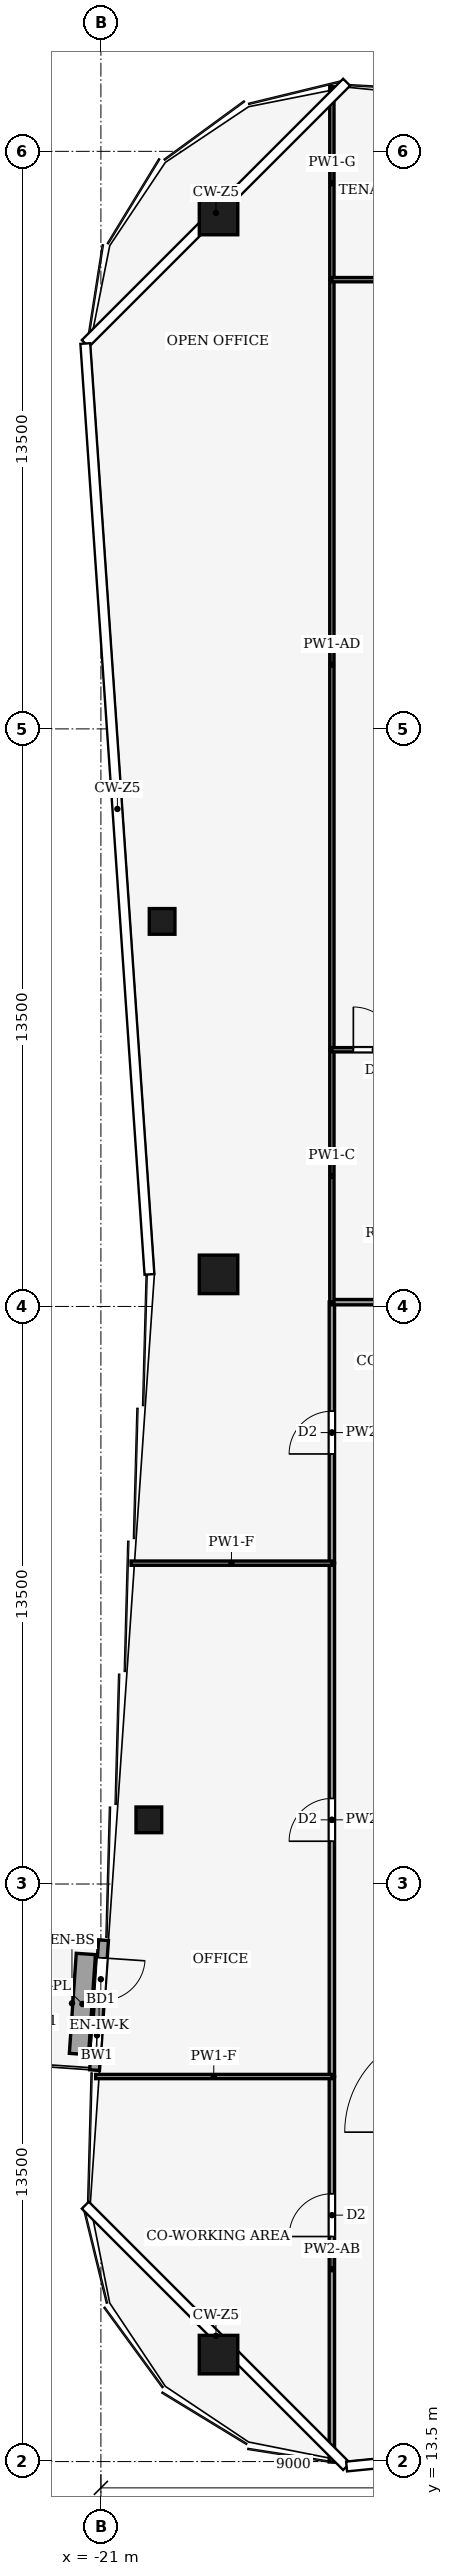
"""IFC4 building model, lengths in metres.
Left out: names, types, materials, properties, quantities, classifications, styles, units other than length and angle.
Written with IfcOpenShell. Run it as: python <this file> out.ifc"""

import sys

from ifc_helpers import new_model, si_unit, direction, frame, frame_2d, origin, origin_2d, place, context, subcontext, project, spatial, rectangle, hollow_rectangle, extrude, element, fill, save


model = new_model("IFC4")
c1 = context("Model", 3, precision=1e-05, world=origin(), true_north=direction((0.0, 1.0)))
c2 = subcontext(c1, "Body", "Model", "MODEL_VIEW")
j1 = project(units=[si_unit("LENGTHUNIT", "METRE"), si_unit("PLANEANGLEUNIT", "RADIAN")], contexts=[c1])
p1 = place(None, origin())
s1 = spatial("IfcSite", under=j1, at=p1, CompositionType="ELEMENT")
p2 = place(p1, origin())
s2 = spatial("IfcBuilding", under=s1, at=p2, CompositionType="ELEMENT")
p3 = place(p2, frame((0.0, 0.0, 302.0)))
s3 = spatial("IfcBuildingStorey", under=s2, at=p3, CompositionType="ELEMENT", Elevation=302.0)
for number, where, z_axis, x_axis in (
    (1, (-18.25, 66.0, 0.0), (0.0, 0.0, 1.0), (1.0, 0.0, 0.0)),
    (2, (-18.25, 16.0, 0.0), (0.0, 0.0, 1.0), (1.0, 0.0, 0.0)),
    (3, (-18.25, 41.25, 0.0), (0.0, 0.0, 1.0), (1.0, 0.0, 0.0)),
):
    element("IfcColumn", number, at=place(p3, frame(where, z_axis=z_axis, x_axis=x_axis)), inside=s3, PredefinedType="COLUMN", context=c2, shape_type="SweptSolid", body=[
        extrude(hollow_rectangle(XDim=0.9, YDim=0.9, WallThickness=0.04, at=origin_2d()), origin(), (0.0, 0.0, 1.0), 4.0),
    ])
for number, where, z_axis, x_axis in (
    (4, (-19.879, 28.5, 0.0), (0.0, 0.0, 1.0), (1.0, 0.0, 0.0)),
    (5, (-19.569, 49.5, 0.0), (0.0, 0.0, 1.0), (1.0, 0.0, 0.0)),
):
    element("IfcColumn", number, at=place(p3, frame(where, z_axis=z_axis, x_axis=x_axis)), inside=s3, PredefinedType="COLUMN", context=c2, shape_type="SweptSolid", body=[
        extrude(hollow_rectangle(XDim=0.6, YDim=0.6, WallThickness=0.025, at=origin_2d()), origin(), (0.0, 0.0, 1.0), 4.0),
    ])
p4 = place(p3, frame((-20.938, 25.687, 0.0), z_axis=(0.0, 0.0, 1.0), x_axis=(-0.068802091615, -0.997630328423, 0.0)))
e6 = element("IfcWall", 6, at=p4, inside=s3, PredefinedType="SOLIDWALL", context=c2, shape_type="SweptSolid", body=[
    extrude(rectangle(XDim=3.045, YDim=0.23, at=frame_2d((1.522, 0.0))), origin(), (0.0, 0.0, 1.0), 3.65),
])
p5 = place(p4, frame((0.415, 0.0, 0.0)))
e7 = element("IfcOpeningElement", 7, at=p5, cuts=e6, PredefinedType="OPENING", context=c2, shape_type="SweptSolid", body=[
    extrude(rectangle(XDim=1.0, YDim=2.1, at=frame_2d((0.5, 1.05))), frame((0.0, 0.125, 0.0), z_axis=(0.0, -1.0, 0.0), x_axis=(1.0, 0.0, 0.0)), (0.0, 0.0, 1.0), 0.25),
])
p6 = place(p4, frame((1.83, 0.0, 0.9)))
e8 = element("IfcOpeningElement", 8, at=p6, cuts=e6, PredefinedType="OPENING", context=c2, shape_type="SweptSolid", body=[
    extrude(rectangle(XDim=0.8, YDim=1.2, at=frame_2d((0.4, 0.6))), frame((0.0, 0.125, 0.0), z_axis=(0.0, -1.0, 0.0), x_axis=(1.0, 0.0, 0.0)), (0.0, 0.0, 1.0), 0.25),
])
p7 = place(p3, frame((-21.352, 25.365, 0.0), z_axis=(0.0, 0.0, 1.0), x_axis=(-0.068723472833, -0.997635747295, 0.0)))
e9 = element("IfcWall", 9, at=p7, inside=s3, PredefinedType="USERDEFINED", context=c2, shape_type="SweptSolid", body=[
    extrude(rectangle(XDim=2.345, YDim=0.45, at=frame_2d((1.172, 0.0))), origin(), (0.0, 0.0, 1.0), 0.4),
])
p8 = place(p3, frame((-15.6, 13.49, 0.0), z_axis=(0.0, 0.0, 1.0), x_axis=(0.0, 1.0, 0.0)))
e10 = element("IfcWall", 10, at=p8, inside=s3, PredefinedType="PARTITIONING", context=c2, shape_type="SweptSolid", body=[
    extrude(rectangle(XDim=9.01, YDim=0.125, at=frame_2d((4.505, 0.0))), origin(), (0.0, 0.0, 1.0), 2.93),
])
p9 = place(p8, frame((5.271, 0.0, 0.0)))
e11 = element("IfcOpeningElement", 11, at=p9, cuts=e10, PredefinedType="OPENING", context=c2, shape_type="SweptSolid", body=[
    extrude(rectangle(XDim=1.0, YDim=2.1, at=frame_2d((0.5, 1.05))), frame((0.0, 0.073, 0.0), z_axis=(0.0, -1.0, 0.0), x_axis=(1.0, 0.0, 0.0)), (0.0, 0.0, 1.0), 0.145),
])
p10 = place(p3, frame((-15.6, 22.5, 0.0), z_axis=(0.0, 0.0, 1.0), x_axis=(0.0, 1.0, 0.0)))
e12 = element("IfcWall", 12, at=p10, inside=s3, PredefinedType="PARTITIONING", context=c2, shape_type="SweptSolid", body=[
    extrude(rectangle(XDim=12.0, YDim=0.125, at=frame_2d((6.0, 0.0))), origin(), (0.0, 0.0, 1.0), 3.54),
])
p11 = place(p10, frame((5.5, 0.0, 0.0)))
e13 = element("IfcOpeningElement", 13, at=p11, cuts=e12, PredefinedType="OPENING", context=c2, shape_type="SweptSolid", body=[
    extrude(rectangle(XDim=1.0, YDim=2.1, at=frame_2d((0.5, 1.05))), frame((0.0, 0.073, 0.0), z_axis=(0.0, -1.0, 0.0), x_axis=(1.0, 0.0, 0.0)), (0.0, 0.0, 1.0), 0.145),
])
p12 = place(p3, frame((-15.6, 34.5, 0.0), z_axis=(0.0, 0.0, 1.0), x_axis=(0.0, 1.0, 0.0)))
e14 = element("IfcWall", 14, at=p12, inside=s3, PredefinedType="PARTITIONING", context=c2, shape_type="SweptSolid", body=[
    extrude(rectangle(XDim=6.104, YDim=0.125, at=frame_2d((3.052, 0.0))), origin(), (0.0, 0.0, 1.0), 3.14),
])
p13 = place(p12, frame((2.552, 0.0, 0.0)))
e15 = element("IfcOpeningElement", 15, at=p13, cuts=e14, PredefinedType="OPENING", context=c2, shape_type="SweptSolid", body=[
    extrude(rectangle(XDim=1.0, YDim=2.1, at=frame_2d((0.5, 1.05))), frame((0.0, 0.073, 0.0), z_axis=(0.0, -1.0, 0.0), x_axis=(1.0, 0.0, 0.0)), (0.0, 0.0, 1.0), 0.145),
])
p14 = place(p3, frame((-15.6, 40.6, 0.0), z_axis=(0.0, 0.0, 1.0), x_axis=(1.0, 0.0, 0.0)))
e16 = element("IfcWall", 16, at=p14, inside=s3, PredefinedType="PARTITIONING", context=c2, shape_type="SweptSolid", body=[
    extrude(rectangle(XDim=3.6, YDim=0.125, at=frame_2d((1.8, 0.0))), origin(), (0.0, 0.0, 1.0), 3.39),
])
p15 = place(p14, frame((1.3, 0.0, 0.0)))
e17 = element("IfcOpeningElement", 17, at=p15, cuts=e16, PredefinedType="OPENING", context=c2, shape_type="SweptSolid", body=[
    extrude(rectangle(XDim=1.0, YDim=2.1, at=frame_2d((0.5, 1.05))), frame((0.0, 0.073, 0.0), z_axis=(0.0, -1.0, 0.0), x_axis=(1.0, 0.0, 0.0)), (0.0, 0.0, 1.0), 0.145),
])
p16 = place(p3, frame((-15.6, 22.5, 0.0), z_axis=(0.0, 0.0, 1.0), x_axis=(-1.0, 0.0, 0.0)))
e18 = element("IfcWall", 18, at=p16, inside=s3, PredefinedType="PARTITIONING", context=c2, shape_type="SweptSolid", body=[
    extrude(rectangle(XDim=5.523, YDim=0.1, at=frame_2d((2.761, 0.0))), origin(), (0.0, 0.0, 1.0), 3.04),
])
p17 = place(p3, frame((-15.6, 34.5, 0.0), z_axis=(0.0, 0.0, 1.0), x_axis=(-1.0, 0.0, 0.0)))
e19 = element("IfcWall", 19, at=p17, inside=s3, PredefinedType="PARTITIONING", context=c2, shape_type="SweptSolid", body=[
    extrude(rectangle(XDim=4.695, YDim=0.1, at=frame_2d((2.348, 0.0))), origin(), (0.0, 0.0, 1.0), 3.04),
])
p18 = place(p3, frame((-15.6, 40.6, 0.0), z_axis=(0.0, 0.0, 1.0), x_axis=(0.0, 1.0, 0.0)))
e20 = element("IfcWall", 20, at=p18, inside=s3, PredefinedType="PARTITIONING", context=c2, shape_type="SweptSolid", body=[
    extrude(rectangle(XDim=5.9, YDim=0.1, at=frame_2d((2.95, 0.0))), origin(), (0.0, 0.0, 1.0), 3.87),
])
p19 = place(p3, frame((-15.6, 46.5, 0.0), z_axis=(0.0, 0.0, 1.0), x_axis=(0.0, 1.0, 0.0)))
e21 = element("IfcWall", 21, at=p19, inside=s3, PredefinedType="PARTITIONING", context=c2, shape_type="SweptSolid", body=[
    extrude(rectangle(XDim=18.0, YDim=0.1, at=frame_2d((9.0, 0.0))), origin(), (0.0, 0.0, 1.0), 3.35),
])
p20 = place(p3, frame((-15.6, 64.5, 0.0), z_axis=(0.0, 0.0, 1.0), x_axis=(0.0, 1.0, 0.0)))
e22 = element("IfcWall", 22, at=p20, inside=s3, PredefinedType="PARTITIONING", context=c2, shape_type="SweptSolid", body=[
    extrude(rectangle(XDim=4.51, YDim=0.1, at=frame_2d((2.255, 0.0))), origin(), (0.0, 0.0, 1.0), 2.93),
])
p21 = place(p3, frame((-15.6, 46.5, 0.0), z_axis=(0.0, 0.0, 1.0), x_axis=(1.0, 0.0, 0.0)))
e23 = element("IfcWall", 23, at=p21, inside=s3, PredefinedType="PARTITIONING", context=c2, shape_type="SweptSolid", body=[
    extrude(rectangle(XDim=3.604, YDim=0.1, at=frame_2d((1.802, 0.0))), origin(), (0.0, 0.0, 1.0), 3.87),
])
p22 = place(p21, frame((0.502, 0.0, 0.0)))
e24 = element("IfcOpeningElement", 24, at=p22, cuts=e23, PredefinedType="OPENING", context=c2, shape_type="SweptSolid", body=[
    extrude(rectangle(XDim=1.0, YDim=2.1, at=frame_2d((0.5, 1.05))), frame((0.0, 0.06, 0.0), z_axis=(0.0, -1.0, 0.0), x_axis=(1.0, 0.0, 0.0)), (0.0, 0.0, 1.0), 0.12),
])
p23 = place(p3, frame((-15.6, 64.5, 0.0), z_axis=(0.0, 0.0, 1.0), x_axis=(1.0, 0.0, 0.0)))
e25 = element("IfcWall", 25, at=p23, inside=s3, PredefinedType="PARTITIONING", context=c2, shape_type="SweptSolid", body=[
    extrude(rectangle(XDim=9.6, YDim=0.1, at=frame_2d((4.8, 0.0))), origin(), (0.0, 0.0, 1.0), 3.24),
])
p24 = place(p23, frame((5.5, 0.0, 0.0)))
e26 = element("IfcOpeningElement", 26, at=p24, cuts=e25, PredefinedType="OPENING", context=c2, shape_type="SweptSolid", body=[
    extrude(rectangle(XDim=1.0, YDim=2.1, at=frame_2d((0.5, 1.05))), frame((0.0, 0.06, 0.0), z_axis=(0.0, -1.0, 0.0), x_axis=(1.0, 0.0, 0.0)), (0.0, 0.0, 1.0), 0.12),
])
p25 = place(p5, origin())
e27 = element("IfcDoor", 27, at=p25, inside=s3, OperationType="SINGLE_SWING_LEFT", PredefinedType="DOOR", context=c2, shape_type="SweptSolid", body=[
    extrude(rectangle(XDim=1.0, YDim=2.1, at=frame_2d((0.5, 1.05))), frame((0.0, 0.025, 0.0), z_axis=(0.0, -1.0, 0.0), x_axis=(1.0, 0.0, 0.0)), (0.0, 0.0, 1.0), 0.05),
])
fill(e7, e27)
p26 = place(p6, origin())
e28 = element("IfcWindow", 28, at=p26, inside=s3, PartitioningType="SINGLE_PANEL", PredefinedType="WINDOW", context=c2, shape_type="SweptSolid", body=[
    extrude(rectangle(XDim=0.8, YDim=1.2, at=frame_2d((0.4, 0.6))), frame((0.0, 0.03, 0.0), z_axis=(0.0, -1.0, 0.0), x_axis=(1.0, 0.0, 0.0)), (0.0, 0.0, 1.0), 0.06),
])
fill(e8, e28)
p27 = place(p9, origin())
e29 = element("IfcDoor", 29, at=p27, inside=s3, OperationType="SINGLE_SWING_RIGHT", PredefinedType="DOOR", context=c2, shape_type="SweptSolid", body=[
    extrude(rectangle(XDim=1.0, YDim=2.1, at=frame_2d((0.5, 1.05))), frame((0.0, 0.025, 0.0), z_axis=(0.0, -1.0, 0.0), x_axis=(1.0, 0.0, 0.0)), (0.0, 0.0, 1.0), 0.05),
])
fill(e11, e29)
p28 = place(p11, origin())
e30 = element("IfcDoor", 30, at=p28, inside=s3, OperationType="SINGLE_SWING_RIGHT", PredefinedType="DOOR", context=c2, shape_type="SweptSolid", body=[
    extrude(rectangle(XDim=1.0, YDim=2.1, at=frame_2d((0.5, 1.05))), frame((0.0, 0.025, 0.0), z_axis=(0.0, -1.0, 0.0), x_axis=(1.0, 0.0, 0.0)), (0.0, 0.0, 1.0), 0.05),
])
fill(e13, e30)
p29 = place(p13, origin())
e31 = element("IfcDoor", 31, at=p29, inside=s3, OperationType="SINGLE_SWING_LEFT", PredefinedType="DOOR", context=c2, shape_type="SweptSolid", body=[
    extrude(rectangle(XDim=1.0, YDim=2.1, at=frame_2d((0.5, 1.05))), frame((0.0, 0.025, 0.0), z_axis=(0.0, -1.0, 0.0), x_axis=(1.0, 0.0, 0.0)), (0.0, 0.0, 1.0), 0.05),
])
fill(e15, e31)
p30 = place(p22, origin())
e32 = element("IfcDoor", 32, at=p30, inside=s3, OperationType="SINGLE_SWING_LEFT", PredefinedType="DOOR", context=c2, shape_type="SweptSolid", body=[
    extrude(rectangle(XDim=1.0, YDim=2.1, at=frame_2d((0.5, 1.05))), frame((0.0, 0.025, 0.0), z_axis=(0.0, -1.0, 0.0), x_axis=(1.0, 0.0, 0.0)), (0.0, 0.0, 1.0), 0.05),
])
fill(e24, e32)
save(model, sys.argv[1])
